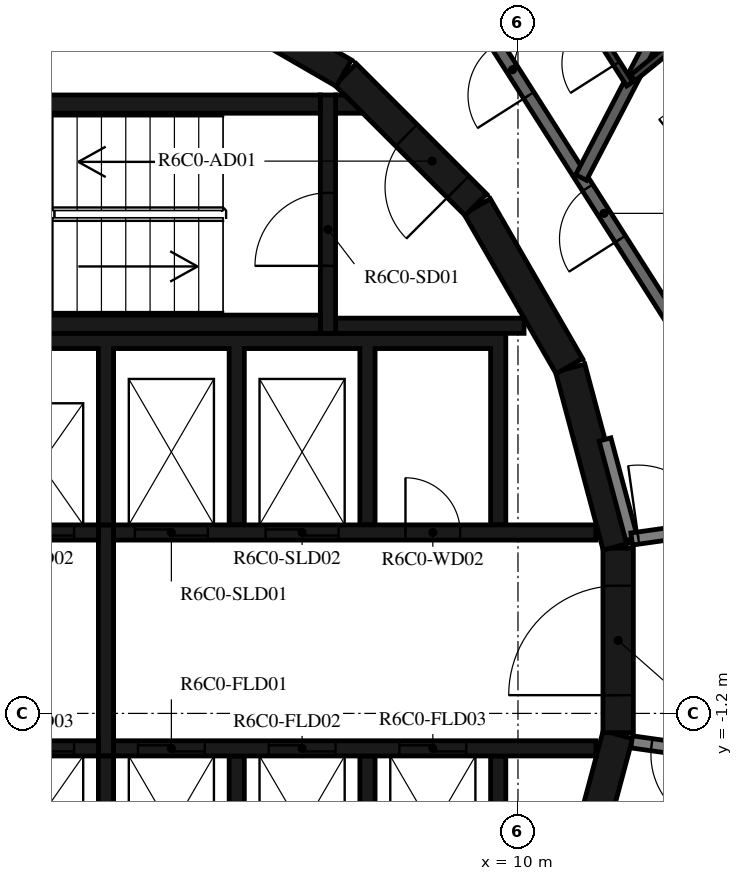
"""IFC4 building model, lengths in metres.
Left out: names, types, materials, properties, quantities, classifications, styles, units other than length and angle.
Written with IfcOpenShell. Run it as: python <this file> out.ifc"""

import sys

from ifc_helpers import new_model, si_unit, direction, frame, frame_2d, origin, place, context, subcontext, project, spatial, polyline, rectangle, outline, extrude, element, fill, save


model = new_model("IFC4")
c1 = context("Model", 3, precision=1e-05, world=origin(), true_north=direction((0.0, 1.0)))
c2 = subcontext(c1, "Body", "Model", "MODEL_VIEW")
j1 = project(units=[si_unit("LENGTHUNIT", "METRE"), si_unit("PLANEANGLEUNIT", "RADIAN")], contexts=[c1])
p1 = place(None, origin())
s1 = spatial("IfcSite", under=j1, at=p1, CompositionType="ELEMENT")
p2 = place(p1, origin())
s2 = spatial("IfcBuilding", under=s1, at=p2, CompositionType="ELEMENT")
p3 = place(p2, frame((0.0, 0.0, 254.7)))
s3 = spatial("IfcBuildingStorey", under=s2, at=p3, CompositionType="ELEMENT", Elevation=254.7)
p4 = place(p3, frame((10.858, -4.479, 0.0), z_axis=(0.0, 0.0, 1.0), x_axis=(0.258734743916, 0.965948410781, 0.0)))
e1 = element("IfcWall", 1, at=p4, inside=s3, PredefinedType="SHEAR", context=c2, shape_type="SweptSolid", body=[
    extrude(rectangle(XDim=3.033, YDim=0.5, at=frame_2d((1.516, 0.0))), origin(), (0.0, 0.0, 1.0), 3.05),
])
p5 = place(p3, frame((11.647, -1.516, 0.0), z_axis=(0.0, 0.0, 1.0), x_axis=(0.0, 1.0, 0.0)))
e2 = element("IfcWall", 2, at=p5, inside=s3, PredefinedType="SHEAR", context=c2, shape_type="SweptSolid", body=[
    extrude(rectangle(XDim=3.033, YDim=0.5, at=frame_2d((1.516, 0.0))), origin(), (0.0, 0.0, 1.0), 3.05),
])
p6 = place(p5, frame((0.616, 0.0, 0.0)))
e3 = element("IfcOpeningElement", 3, at=p6, cuts=e2, PredefinedType="OPENING", context=c2, shape_type="SweptSolid", body=[
    extrude(rectangle(XDim=1.8, YDim=2.1, at=frame_2d((0.9, 1.05))), frame((0.0, 0.26, 0.0), z_axis=(0.0, -1.0, 0.0), x_axis=(1.0, 0.0, 0.0)), (0.0, 0.0, 1.0), 0.52),
])
for number, where, z_axis, x_axis in (
    (4, (11.643, 1.55, 0.0), (0.0, 0.0, 1.0), (-0.259, 0.966, 0.0)),
    (5, (10.845, 4.51, 0.0), (0.0, 0.0, 1.0), (-0.5, 0.866, 0.0)),
):
    element("IfcWall", number, at=place(p3, frame(where, z_axis=z_axis, x_axis=x_axis)), inside=s3, PredefinedType="SHEAR", context=c2, shape_type="SweptSolid", body=[
        extrude(rectangle(XDim=3.033, YDim=0.5, at=frame_2d((1.516, 0.0))), origin(), (0.0, 0.0, 1.0), 3.05),
    ])
p7 = place(p3, frame((9.308, 7.164, 0.0), z_axis=(0.0, 0.0, 1.0), x_axis=(-0.707106781187, 0.707106781187, 0.0)))
e6 = element("IfcWall", 6, at=p7, inside=s3, PredefinedType="SHEAR", context=c2, shape_type="SweptSolid", body=[
    extrude(rectangle(XDim=3.032, YDim=0.5, at=frame_2d((1.516, 0.0))), origin(), (0.0, 0.0, 1.0), 3.05),
])
p8 = place(p7, frame((0.416, 0.0, 0.0)))
e7 = element("IfcOpeningElement", 7, at=p8, cuts=e6, PredefinedType="OPENING", context=c2, shape_type="SweptSolid", body=[
    extrude(rectangle(XDim=1.2, YDim=2.1, at=frame_2d((0.6, 1.05))), frame((0.0, 0.26, 0.0), z_axis=(0.0, -1.0, 0.0), x_axis=(1.0, 0.0, 0.0)), (0.0, 0.0, 1.0), 0.52),
])
p9 = place(p3, frame((7.137, 9.329, 0.0), z_axis=(0.0, 0.0, 1.0), x_axis=(-0.865975092491, 0.500087131594, 0.0)))
e8 = element("IfcWall", 8, at=p9, inside=s3, PredefinedType="SHEAR", context=c2, shape_type="SweptSolid", body=[
    extrude(rectangle(XDim=3.033, YDim=0.5, at=frame_2d((1.516, 0.0))), origin(), (0.0, 0.0, 1.0), 3.05),
])
for number, where, z_axis, x_axis in (
    (9, (0.0, 5.2, 0.0), (0.0, 0.0, 1.0), (1.0, 0.0, 0.0)),
    (10, (0.0, 8.82, 0.0), (0.0, 0.0, 1.0), (1.0, 0.0, 0.0)),
):
    element("IfcWall", number, at=place(p3, frame(where, z_axis=z_axis, x_axis=x_axis)), inside=s3, PredefinedType="SHEAR", context=c2, shape_type="SweptSolid", body=[
        extrude(rectangle(XDim=6.75, YDim=0.3, at=frame_2d((3.375, 0.0))), origin(), (0.0, 0.0, 1.0), 3.05),
    ])
p10 = place(p3, frame((6.875, 5.05, 0.0), z_axis=(0.0, 0.0, 1.0), x_axis=(0.0, 1.0, 0.0)))
e11 = element("IfcWall", 11, at=p10, inside=s3, PredefinedType="SHEAR", context=c2, shape_type="SweptSolid", body=[
    extrude(rectangle(XDim=3.92, YDim=0.25, at=frame_2d((1.96, 0.0))), origin(), (0.0, 0.0, 1.0), 3.05),
])
p11 = place(p10, frame((1.11, 0.0, 0.0)))
e12 = element("IfcOpeningElement", 12, at=p11, cuts=e11, PredefinedType="OPENING", context=c2, shape_type="SweptSolid", body=[
    extrude(rectangle(XDim=1.2, YDim=2.1, at=frame_2d((0.6, 1.05))), frame((0.0, 0.135, 0.0), z_axis=(0.0, -1.0, 0.0), x_axis=(1.0, 0.0, 0.0)), (0.0, 0.0, 1.0), 0.27),
])
p12 = place(p3, frame((7.0, 5.175, 0.0), z_axis=(0.0, 0.0, 1.0), x_axis=(1.0, 0.0, 0.0)))
e13 = element("IfcWall", 13, at=p12, inside=s3, PredefinedType="SHEAR", context=c2, shape_type="SweptSolid", body=[
    extrude(rectangle(XDim=3.1, YDim=0.25, at=frame_2d((1.55, 0.0))), origin(), (0.0, 0.0, 1.0), 3.05),
])
p13 = place(p3, origin())
e14 = element("IfcWall", 14, at=p13, inside=s3, PredefinedType="SHEAR", context=c2, shape_type="SweptSolid", body=[
    extrude(outline(polyline([(7.448, 8.67), (7.0, 8.67), (7.0, 8.97), (7.148, 8.97), (7.448, 8.67)])), origin(), (0.0, 0.0, 1.0), 3.05),
])
p14 = place(p3, origin())
e15 = element("IfcWall", 15, at=p14, inside=s3, PredefinedType="SHEAR", context=c2, shape_type="SweptSolid", body=[
    extrude(outline(polyline([(-9.55, 4.8), (-1.2, 4.8), (-1.2, 1.9), (-0.95, 1.9), (-0.95, 4.8), (0.95, 4.8), (0.95, 1.9), (1.2, 1.9), (1.2, 4.8), (3.1, 4.8), (3.1, 1.9), (3.35, 1.9), (3.35, 4.8), (5.25, 4.8), (5.25, 1.9), (5.5, 1.9), (5.5, 4.8), (7.4, 4.8), (7.4, 1.9), (7.65, 1.9), (7.65, 4.8), (9.55, 4.8), (9.55, 1.9), (9.8, 1.9), (9.8, 4.8), (9.8, 5.05), (-9.8, 5.05), (-9.8, 4.8), (-9.8, 1.9), (-9.55, 1.9), (-9.55, 4.8)])), origin(), (0.0, 0.0, 1.0), 3.05),
])
p15 = place(p3, origin())
e16 = element("IfcWall", 16, at=p15, inside=s3, PredefinedType="SHEAR", context=c2, shape_type="SweptSolid", body=[
    extrude(outline(polyline([(9.8, -5.05), (9.8, -4.8), (9.8, -1.9), (9.55, -1.9), (9.55, -4.8), (7.65, -4.8), (7.65, -1.9), (7.4, -1.9), (7.4, -4.8), (5.5, -4.8), (5.5, -1.9), (5.25, -1.9), (5.25, -4.8), (3.35, -4.8), (3.35, -1.9), (3.1, -1.9), (3.1, -4.8), (1.2, -4.8), (1.2, -1.9), (0.95, -1.9), (0.95, -4.8), (-0.95, -4.8), (-0.95, -1.9), (-1.2, -1.9), (-1.2, -4.8), (-3.1, -4.8), (-3.1, -1.9), (-3.35, -1.9), (-3.35, -4.8), (-5.25, -4.8), (-5.25, -1.9), (-5.5, -1.9), (-5.5, -4.8), (-7.4, -4.8), (-7.4, -1.9), (-7.65, -1.9), (-7.65, -4.8), (-9.55, -4.8), (-9.55, -1.9), (-9.8, -1.9), (-9.8, -4.8), (-9.8, -5.05), (9.8, -5.05)])), origin(), (0.0, 0.0, 1.0), 3.05),
])
p16 = place(p3, frame((-11.28, 1.775, 0.0), z_axis=(0.0, 0.0, 1.0), x_axis=(1.0, 0.0, 0.0)))
e17 = element("IfcWall", 17, at=p16, inside=s3, PredefinedType="SHEAR", context=c2, shape_type="SweptSolid", body=[
    extrude(rectangle(XDim=14.38, YDim=0.25, at=frame_2d((7.19, 0.0))), origin(), (0.0, 0.0, 1.0), 3.05),
])
p17 = place(p16, frame((10.73, 0.0, 0.0)))
e18 = element("IfcOpeningElement", 18, at=p17, cuts=e17, PredefinedType="OPENING", context=c2, shape_type="SweptSolid", body=[
    extrude(rectangle(XDim=1.1, YDim=2.1, at=frame_2d((0.55, 1.05))), frame((0.0, 0.135, 0.0), z_axis=(0.0, -1.0, 0.0), x_axis=(1.0, 0.0, 0.0)), (0.0, 0.0, 1.0), 0.27),
])
p18 = place(p16, frame((12.88, 0.0, 0.0)))
e19 = element("IfcOpeningElement", 19, at=p18, cuts=e17, PredefinedType="OPENING", context=c2, shape_type="SweptSolid", body=[
    extrude(rectangle(XDim=1.1, YDim=2.1, at=frame_2d((0.55, 1.05))), frame((0.0, 0.135, 0.0), z_axis=(0.0, -1.0, 0.0), x_axis=(1.0, 0.0, 0.0)), (0.0, 0.0, 1.0), 0.27),
])
p19 = place(p16, frame((5.455, 0.0, 0.0)))
e20 = element("IfcOpeningElement", 20, at=p19, cuts=e17, PredefinedType="OPENING", context=c2, shape_type="SweptSolid", body=[
    extrude(rectangle(XDim=0.9, YDim=2.1, at=frame_2d((0.45, 1.05))), frame((0.0, 0.135, 0.0), z_axis=(0.0, -1.0, 0.0), x_axis=(1.0, 0.0, 0.0)), (0.0, 0.0, 1.0), 0.27),
])
p20 = place(p3, frame((3.35, 1.775, 0.0), z_axis=(0.0, 0.0, 1.0), x_axis=(1.0, 0.0, 0.0)))
e21 = element("IfcWall", 21, at=p20, inside=s3, PredefinedType="SHEAR", context=c2, shape_type="SweptSolid", body=[
    extrude(rectangle(XDim=7.93, YDim=0.25, at=frame_2d((3.965, 0.0))), origin(), (0.0, 0.0, 1.0), 3.05),
])
p21 = place(p20, frame((0.35, 0.0, 0.0)))
e22 = element("IfcOpeningElement", 22, at=p21, cuts=e21, PredefinedType="OPENING", context=c2, shape_type="SweptSolid", body=[
    extrude(rectangle(XDim=1.2, YDim=2.4, at=frame_2d((0.6, 1.2))), frame((0.0, 0.135, 0.0), z_axis=(0.0, -1.0, 0.0), x_axis=(1.0, 0.0, 0.0)), (0.0, 0.0, 1.0), 0.27),
])
p22 = place(p20, frame((2.5, 0.0, 0.0)))
e23 = element("IfcOpeningElement", 23, at=p22, cuts=e21, PredefinedType="OPENING", context=c2, shape_type="SweptSolid", body=[
    extrude(rectangle(XDim=1.2, YDim=2.4, at=frame_2d((0.6, 1.2))), frame((0.0, 0.135, 0.0), z_axis=(0.0, -1.0, 0.0), x_axis=(1.0, 0.0, 0.0)), (0.0, 0.0, 1.0), 0.27),
])
p23 = place(p20, frame((4.8, 0.0, 0.0)))
e24 = element("IfcOpeningElement", 24, at=p23, cuts=e21, PredefinedType="OPENING", context=c2, shape_type="SweptSolid", body=[
    extrude(rectangle(XDim=0.9, YDim=2.1, at=frame_2d((0.45, 1.05))), frame((0.0, 0.135, 0.0), z_axis=(0.0, -1.0, 0.0), x_axis=(1.0, 0.0, 0.0)), (0.0, 0.0, 1.0), 0.27),
])
p24 = place(p3, frame((-11.28, -1.775, 0.0), z_axis=(0.0, 0.0, 1.0), x_axis=(1.0, 0.0, 0.0)))
e25 = element("IfcWall", 25, at=p24, inside=s3, PredefinedType="SHEAR", context=c2, shape_type="SweptSolid", body=[
    extrude(rectangle(XDim=14.38, YDim=0.25, at=frame_2d((7.19, 0.0))), origin(), (0.0, 0.0, 1.0), 3.05),
])
p25 = place(p24, frame((12.88, 0.0, 0.0)))
e26 = element("IfcOpeningElement", 26, at=p25, cuts=e25, PredefinedType="OPENING", context=c2, shape_type="SweptSolid", body=[
    extrude(rectangle(XDim=1.1, YDim=2.1, at=frame_2d((0.55, 1.05))), frame((0.0, 0.135, 0.0), z_axis=(0.0, -1.0, 0.0), x_axis=(1.0, 0.0, 0.0)), (0.0, 0.0, 1.0), 0.27),
])
p26 = place(p24, frame((6.53, 0.0, 0.0)))
e27 = element("IfcOpeningElement", 27, at=p26, cuts=e25, PredefinedType="OPENING", context=c2, shape_type="SweptSolid", body=[
    extrude(rectangle(XDim=0.9, YDim=2.1, at=frame_2d((0.45, 1.05))), frame((0.0, 0.135, 0.0), z_axis=(0.0, -1.0, 0.0), x_axis=(1.0, 0.0, 0.0)), (0.0, 0.0, 1.0), 0.27),
])
p27 = place(p24, frame((8.68, 0.0, 0.0)))
e28 = element("IfcOpeningElement", 28, at=p27, cuts=e25, PredefinedType="OPENING", context=c2, shape_type="SweptSolid", body=[
    extrude(rectangle(XDim=0.9, YDim=2.1, at=frame_2d((0.45, 1.05))), frame((0.0, 0.135, 0.0), z_axis=(0.0, -1.0, 0.0), x_axis=(1.0, 0.0, 0.0)), (0.0, 0.0, 1.0), 0.27),
])
p28 = place(p24, frame((10.83, 0.0, 0.0)))
e29 = element("IfcOpeningElement", 29, at=p28, cuts=e25, PredefinedType="OPENING", context=c2, shape_type="SweptSolid", body=[
    extrude(rectangle(XDim=0.9, YDim=2.1, at=frame_2d((0.45, 1.05))), frame((0.0, 0.135, 0.0), z_axis=(0.0, -1.0, 0.0), x_axis=(1.0, 0.0, 0.0)), (0.0, 0.0, 1.0), 0.27),
])
p29 = place(p3, frame((3.35, -1.775, 0.0), z_axis=(0.0, 0.0, 1.0), x_axis=(1.0, 0.0, 0.0)))
e30 = element("IfcWall", 30, at=p29, inside=s3, PredefinedType="SHEAR", context=c2, shape_type="SweptSolid", body=[
    extrude(rectangle(XDim=7.93, YDim=0.25, at=frame_2d((3.965, 0.0))), origin(), (0.0, 0.0, 1.0), 3.05),
])
p30 = place(p29, frame((0.4, 0.0, 0.0)))
e31 = element("IfcOpeningElement", 31, at=p30, cuts=e30, PredefinedType="OPENING", context=c2, shape_type="SweptSolid", body=[
    extrude(rectangle(XDim=1.1, YDim=2.4, at=frame_2d((0.55, 1.2))), frame((0.0, 0.135, 0.0), z_axis=(0.0, -1.0, 0.0), x_axis=(1.0, 0.0, 0.0)), (0.0, 0.0, 1.0), 0.27),
])
p31 = place(p29, frame((2.55, 0.0, 0.0)))
e32 = element("IfcOpeningElement", 32, at=p31, cuts=e30, PredefinedType="OPENING", context=c2, shape_type="SweptSolid", body=[
    extrude(rectangle(XDim=1.1, YDim=2.4, at=frame_2d((0.55, 1.2))), frame((0.0, 0.135, 0.0), z_axis=(0.0, -1.0, 0.0), x_axis=(1.0, 0.0, 0.0)), (0.0, 0.0, 1.0), 0.27),
])
p32 = place(p29, frame((4.7, 0.0, 0.0)))
e33 = element("IfcOpeningElement", 33, at=p32, cuts=e30, PredefinedType="OPENING", context=c2, shape_type="SweptSolid", body=[
    extrude(rectangle(XDim=1.1, YDim=2.4, at=frame_2d((0.55, 1.2))), frame((0.0, 0.135, 0.0), z_axis=(0.0, -1.0, 0.0), x_axis=(1.0, 0.0, 0.0)), (0.0, 0.0, 1.0), 0.27),
])
p33 = place(p3, frame((3.225, -1.9, 0.0), z_axis=(0.0, 0.0, 1.0), x_axis=(0.0, 1.0, 0.0)))
e34 = element("IfcWall", 34, at=p33, inside=s3, PredefinedType="SHEAR", context=c2, shape_type="SweptSolid", body=[
    extrude(rectangle(XDim=3.8, YDim=0.25, at=frame_2d((1.9, 0.0))), origin(), (0.0, 0.0, 1.0), 3.05),
])
p34 = place(p3, frame((11.87, 1.668, 0.0), z_axis=(0.0, 0.0, 1.0), x_axis=(-0.258836880648, 0.965921047093, 0.0)))
e35 = element("IfcWall", 35, at=p34, inside=s3, PredefinedType="STANDARD", context=c2, shape_type="SweptSolid", body=[
    extrude(rectangle(XDim=1.695, YDim=0.2, at=frame_2d((0.848, 0.0))), origin(), (0.0, 0.0, 1.0), 3.05),
])
p35 = place(p3, frame((11.87, 1.668, 0.0), z_axis=(0.0, 0.0, 1.0), x_axis=(0.990267985606, 0.139173692496, 0.0)))
e36 = element("IfcWall", 36, at=p35, inside=s3, PredefinedType="STANDARD", context=c2, shape_type="SweptSolid", body=[
    extrude(rectangle(XDim=1.475, YDim=0.2, at=frame_2d((0.738, 0.0))), origin(), (0.0, 0.0, 1.0), 3.05),
])
p36 = place(p35, frame((0.11, 0.0, 0.0)))
e37 = element("IfcOpeningElement", 37, at=p36, cuts=e36, PredefinedType="OPENING", context=c2, shape_type="SweptSolid", body=[
    extrude(rectangle(XDim=1.2, YDim=2.1, at=frame_2d((0.6, 1.05))), frame((0.0, 0.11, 0.0), z_axis=(0.0, -1.0, 0.0), x_axis=(1.0, 0.0, 0.0)), (0.0, 0.0, 1.0), 0.22),
])
p37 = place(p3, frame((13.231, 4.172, 0.0), z_axis=(0.0, 0.0, 1.0), x_axis=(-0.537304397561, 0.843388394728, 0.0)))
e38 = element("IfcWall", 38, at=p37, inside=s3, PredefinedType="STANDARD", context=c2, shape_type="SweptSolid", body=[
    extrude(rectangle(XDim=7.181, YDim=0.2, at=frame_2d((3.59, 0.0))), origin(), (0.0, 0.0, 1.0), 3.05),
])
p38 = place(p37, frame((2.881, 0.0, 0.0)))
e39 = element("IfcOpeningElement", 39, at=p38, cuts=e38, PredefinedType="OPENING", context=c2, shape_type="SweptSolid", body=[
    extrude(rectangle(XDim=1.0, YDim=2.1, at=frame_2d((0.5, 1.05))), frame((0.0, 0.11, 0.0), z_axis=(0.0, -1.0, 0.0), x_axis=(1.0, 0.0, 0.0)), (0.0, 0.0, 1.0), 0.22),
])
p39 = place(p37, frame((5.681, 0.0, 0.0)))
e40 = element("IfcOpeningElement", 40, at=p39, cuts=e38, PredefinedType="OPENING", context=c2, shape_type="SweptSolid", body=[
    extrude(rectangle(XDim=1.0, YDim=2.1, at=frame_2d((0.5, 1.05))), frame((0.0, 0.11, 0.0), z_axis=(0.0, -1.0, 0.0), x_axis=(1.0, 0.0, 0.0)), (0.0, 0.0, 1.0), 0.22),
])
p40 = place(p3, frame((13.496, -1.897, 0.0), z_axis=(0.0, 0.0, 1.0), x_axis=(-0.99026234641, 0.139213811391, 0.0)))
e41 = element("IfcWall", 41, at=p40, inside=s3, PredefinedType="STANDARD", context=c2, shape_type="SweptSolid", body=[
    extrude(rectangle(XDim=1.641, YDim=0.2, at=frame_2d((0.821, 0.0))), origin(), (0.0, 0.0, 1.0), 3.05),
])
p41 = place(p40, frame((0.11, 0.0, 0.0)))
e42 = element("IfcOpeningElement", 42, at=p41, cuts=e41, PredefinedType="OPENING", context=c2, shape_type="SweptSolid", body=[
    extrude(rectangle(XDim=1.2, YDim=2.1, at=frame_2d((0.6, 1.05))), frame((0.0, 0.11, 0.0), z_axis=(0.0, -1.0, 0.0), x_axis=(1.0, 0.0, 0.0)), (0.0, 0.0, 1.0), 0.22),
])
p42 = place(p3, frame((13.801, 12.922, 0.0), z_axis=(0.0, 0.0, 1.0), x_axis=(-0.461726485624, -0.887022351733, 0.0)))
e43 = element("IfcWall", 43, at=p42, inside=s3, PredefinedType="STANDARD", context=c2, shape_type="SweptSolid", body=[
    extrude(rectangle(XDim=5.984, YDim=0.2, at=frame_2d((2.992, 0.0))), origin(), (0.0, 0.0, 1.0), 3.05),
])
p43 = place(p3, frame((12.898, 10.069, 0.0), z_axis=(0.0, 0.0, 1.0), x_axis=(-0.777069405334, -0.629414918232, 0.0)))
e44 = element("IfcWall", 44, at=p43, inside=s3, PredefinedType="PARTITIONING", context=c2, shape_type="SweptSolid", body=[
    extrude(rectangle(XDim=1.296, YDim=0.12, at=frame_2d((0.648, 0.0))), origin(), (0.0, 0.0, 1.0), 3.05),
])
p44 = place(p3, frame((11.838, 9.15, 0.0), z_axis=(0.0, 0.0, 1.0), x_axis=(-0.537288949014, 0.843398236462, 0.0)))
e45 = element("IfcWall", 45, at=p44, inside=s3, PredefinedType="PARTITIONING", context=c2, shape_type="SweptSolid", body=[
    extrude(rectangle(XDim=2.636, YDim=0.12, at=frame_2d((1.318, 0.0))), origin(), (0.0, 0.0, 1.0), 3.05),
])
p45 = place(p44, frame((0.4, 0.0, 0.0)))
e46 = element("IfcOpeningElement", 46, at=p45, cuts=e45, PredefinedType="OPENING", context=c2, shape_type="SweptSolid", body=[
    extrude(rectangle(XDim=0.9, YDim=2.1, at=frame_2d((0.45, 1.05))), frame((0.0, 0.07, 0.0), z_axis=(0.0, -1.0, 0.0), x_axis=(1.0, 0.0, 0.0)), (0.0, 0.0, 1.0), 0.14),
])
p46 = place(p11, origin())
e47 = element("IfcDoor", 47, at=p46, inside=s3, OperationType="SINGLE_SWING_LEFT", PredefinedType="DOOR", context=c2, shape_type="SweptSolid", body=[
    extrude(rectangle(XDim=1.2, YDim=2.1, at=frame_2d((0.6, 1.05))), frame((0.0, 0.025, 0.0), z_axis=(0.0, -1.0, 0.0), x_axis=(1.0, 0.0, 0.0)), (0.0, 0.0, 1.0), 0.05),
])
fill(e12, e47)
p47 = place(p8, origin())
e48 = element("IfcDoor", 48, at=p47, inside=s3, OperationType="SINGLE_SWING_RIGHT", PredefinedType="DOOR", context=c2, shape_type="SweptSolid", body=[
    extrude(rectangle(XDim=1.2, YDim=2.1, at=frame_2d((0.6, 1.05))), frame((0.0, 0.025, 0.0), z_axis=(0.0, -1.0, 0.0), x_axis=(1.0, 0.0, 0.0)), (0.0, 0.0, 1.0), 0.05),
])
fill(e7, e48)
p48 = place(p6, origin())
e49 = element("IfcDoor", 49, at=p48, inside=s3, OperationType="DOUBLE_DOOR_SINGLE_SWING", PredefinedType="DOOR", context=c2, shape_type="SweptSolid", body=[
    extrude(rectangle(XDim=1.8, YDim=2.1, at=frame_2d((0.9, 1.05))), frame((0.0, 0.025, 0.0), z_axis=(0.0, -1.0, 0.0), x_axis=(1.0, 0.0, 0.0)), (0.0, 0.0, 1.0), 0.05),
])
fill(e3, e49)
p49 = place(p18, origin())
e50 = element("IfcDoor", 50, at=p49, inside=s3, OperationType="DOUBLE_DOOR_SLIDING", PredefinedType="DOOR", context=c2, shape_type="SweptSolid", body=[
    extrude(rectangle(XDim=1.1, YDim=2.1, at=frame_2d((0.55, 1.05))), frame((0.0, 0.025, 0.0), z_axis=(0.0, -1.0, 0.0), x_axis=(1.0, 0.0, 0.0)), (0.0, 0.0, 1.0), 0.05),
])
fill(e19, e50)
p50 = place(p21, origin())
e51 = element("IfcDoor", 51, at=p50, inside=s3, OperationType="DOUBLE_DOOR_SLIDING", PredefinedType="DOOR", context=c2, shape_type="SweptSolid", body=[
    extrude(rectangle(XDim=1.2, YDim=2.4, at=frame_2d((0.6, 1.2))), frame((0.0, 0.025, 0.0), z_axis=(0.0, -1.0, 0.0), x_axis=(1.0, 0.0, 0.0)), (0.0, 0.0, 1.0), 0.05),
])
fill(e22, e51)
p51 = place(p22, origin())
e52 = element("IfcDoor", 52, at=p51, inside=s3, OperationType="DOUBLE_DOOR_SLIDING", PredefinedType="DOOR", context=c2, shape_type="SweptSolid", body=[
    extrude(rectangle(XDim=1.2, YDim=2.4, at=frame_2d((0.6, 1.2))), frame((0.0, 0.025, 0.0), z_axis=(0.0, -1.0, 0.0), x_axis=(1.0, 0.0, 0.0)), (0.0, 0.0, 1.0), 0.05),
])
fill(e23, e52)
p52 = place(p25, origin())
e53 = element("IfcDoor", 53, at=p52, inside=s3, OperationType="DOUBLE_DOOR_SLIDING", PredefinedType="DOOR", context=c2, shape_type="SweptSolid", body=[
    extrude(rectangle(XDim=1.1, YDim=2.1, at=frame_2d((0.55, 1.05))), frame((0.0, 0.025, 0.0), z_axis=(0.0, -1.0, 0.0), x_axis=(1.0, 0.0, 0.0)), (0.0, 0.0, 1.0), 0.05),
])
fill(e26, e53)
p53 = place(p30, origin())
e54 = element("IfcDoor", 54, at=p53, inside=s3, OperationType="DOUBLE_DOOR_SLIDING", PredefinedType="DOOR", context=c2, shape_type="SweptSolid", body=[
    extrude(rectangle(XDim=1.1, YDim=2.4, at=frame_2d((0.55, 1.2))), frame((0.0, 0.025, 0.0), z_axis=(0.0, -1.0, 0.0), x_axis=(1.0, 0.0, 0.0)), (0.0, 0.0, 1.0), 0.05),
])
fill(e31, e54)
p54 = place(p31, origin())
e55 = element("IfcDoor", 55, at=p54, inside=s3, OperationType="DOUBLE_DOOR_SLIDING", PredefinedType="DOOR", context=c2, shape_type="SweptSolid", body=[
    extrude(rectangle(XDim=1.1, YDim=2.4, at=frame_2d((0.55, 1.2))), frame((0.0, 0.025, 0.0), z_axis=(0.0, -1.0, 0.0), x_axis=(1.0, 0.0, 0.0)), (0.0, 0.0, 1.0), 0.05),
])
fill(e32, e55)
p55 = place(p32, origin())
e56 = element("IfcDoor", 56, at=p55, inside=s3, OperationType="DOUBLE_DOOR_SLIDING", PredefinedType="DOOR", context=c2, shape_type="SweptSolid", body=[
    extrude(rectangle(XDim=1.1, YDim=2.4, at=frame_2d((0.55, 1.2))), frame((0.0, 0.025, 0.0), z_axis=(0.0, -1.0, 0.0), x_axis=(1.0, 0.0, 0.0)), (0.0, 0.0, 1.0), 0.05),
])
fill(e33, e56)
p56 = place(p23, origin())
e57 = element("IfcDoor", 57, at=p56, inside=s3, OperationType="SINGLE_SWING_RIGHT", PredefinedType="DOOR", context=c2, shape_type="SweptSolid", body=[
    extrude(rectangle(XDim=0.9, YDim=2.1, at=frame_2d((0.45, 1.05))), frame((0.0, 0.025, 0.0), z_axis=(0.0, -1.0, 0.0), x_axis=(1.0, 0.0, 0.0)), (0.0, 0.0, 1.0), 0.05),
])
fill(e24, e57)
p57 = place(p38, origin())
e58 = element("IfcDoor", 58, at=p57, inside=s3, OperationType="SINGLE_SWING_LEFT", PredefinedType="DOOR", context=c2, shape_type="SweptSolid", body=[
    extrude(rectangle(XDim=1.0, YDim=2.1, at=frame_2d((0.5, 1.05))), frame((0.0, 0.025, 0.0), z_axis=(0.0, -1.0, 0.0), x_axis=(1.0, 0.0, 0.0)), (0.0, 0.0, 1.0), 0.05),
])
fill(e39, e58)
p58 = place(p39, origin())
e59 = element("IfcDoor", 59, at=p58, inside=s3, OperationType="SINGLE_SWING_LEFT", PredefinedType="DOOR", context=c2, shape_type="SweptSolid", body=[
    extrude(rectangle(XDim=1.0, YDim=2.1, at=frame_2d((0.5, 1.05))), frame((0.0, 0.025, 0.0), z_axis=(0.0, -1.0, 0.0), x_axis=(1.0, 0.0, 0.0)), (0.0, 0.0, 1.0), 0.05),
])
fill(e40, e59)
p59 = place(p45, origin())
e60 = element("IfcDoor", 60, at=p59, inside=s3, OperationType="SINGLE_SWING_LEFT", PredefinedType="DOOR", context=c2, shape_type="SweptSolid", body=[
    extrude(rectangle(XDim=0.9, YDim=2.1, at=frame_2d((0.45, 1.05))), frame((0.0, 0.025, 0.0), z_axis=(0.0, -1.0, 0.0), x_axis=(1.0, 0.0, 0.0)), (0.0, 0.0, 1.0), 0.05),
])
fill(e46, e60)
p60 = place(p36, origin())
e61 = element("IfcDoor", 61, at=p60, inside=s3, OperationType="DOUBLE_DOOR_SINGLE_SWING", PredefinedType="DOOR", context=c2, shape_type="SweptSolid", body=[
    extrude(rectangle(XDim=1.2, YDim=2.1, at=frame_2d((0.6, 1.05))), frame((0.0, 0.025, 0.0), z_axis=(0.0, -1.0, 0.0), x_axis=(1.0, 0.0, 0.0)), (0.0, 0.0, 1.0), 0.05),
])
fill(e37, e61)
p61 = place(p41, origin())
e62 = element("IfcDoor", 62, at=p61, inside=s3, OperationType="DOUBLE_DOOR_SINGLE_SWING", PredefinedType="DOOR", context=c2, shape_type="SweptSolid", body=[
    extrude(rectangle(XDim=1.2, YDim=2.1, at=frame_2d((0.6, 1.05))), frame((0.0, 0.025, 0.0), z_axis=(0.0, -1.0, 0.0), x_axis=(1.0, 0.0, 0.0)), (0.0, 0.0, 1.0), 0.05),
])
fill(e42, e62)
save(model, sys.argv[1])
